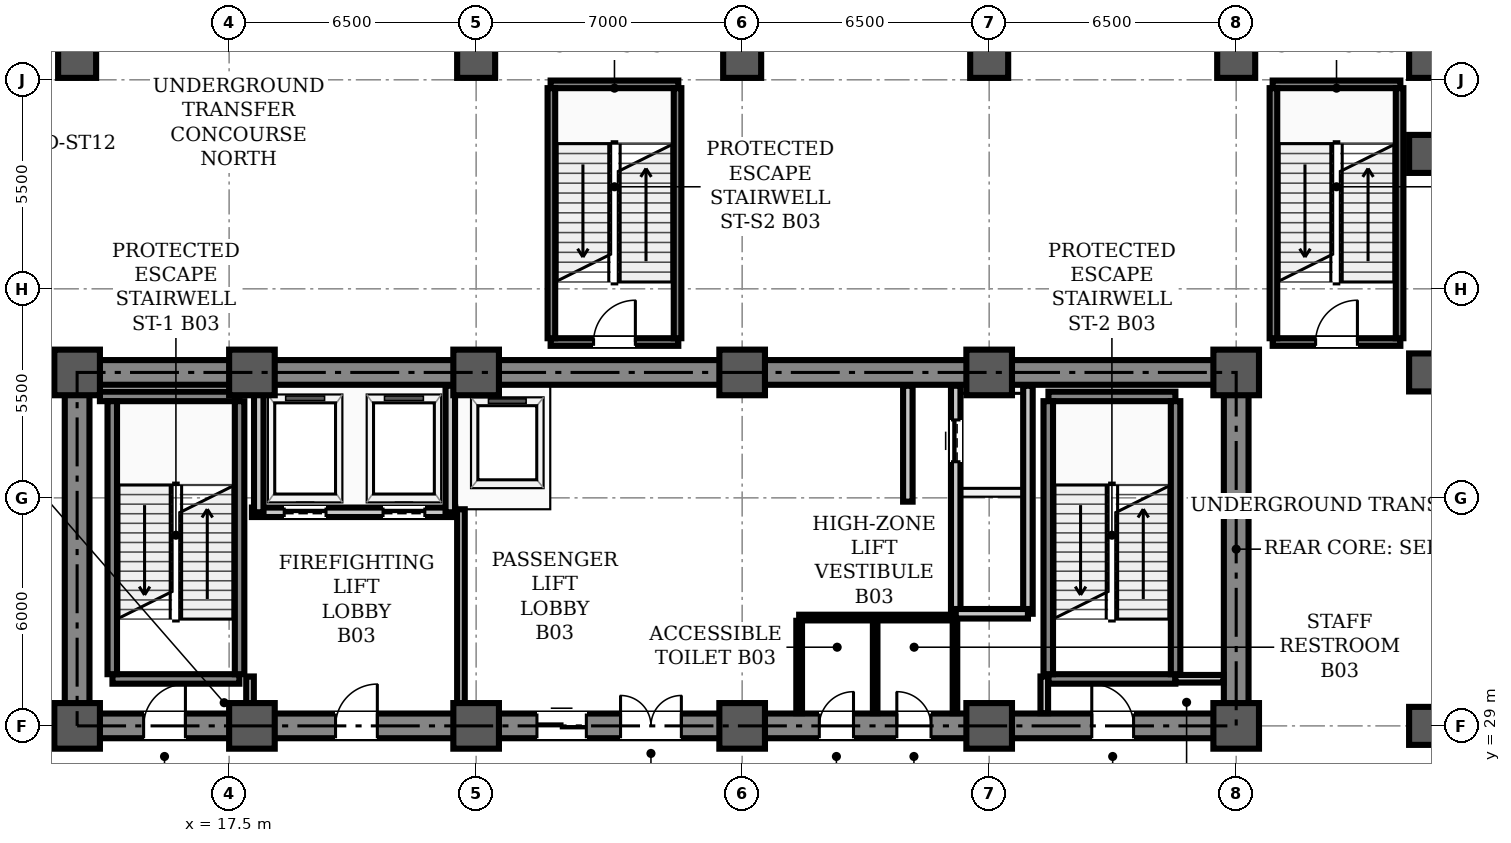
"""IFC4 building model, lengths in metres.
Left out: names, types, materials, properties, quantities, classifications, styles, units other than length and angle.
Written with IfcOpenShell. Run it as: python <this file> out.ifc"""

import sys

from ifc_helpers import new_model, si_unit, direction, frame, frame_2d, origin, origin_2d, place, context, subcontext, project, spatial, rectangle, hollow_rectangle, extrude, element, fill, save


model = new_model("IFC4")
c1 = context("Model", 3, precision=1e-05, world=origin(), true_north=direction((0.0, 1.0)))
c2 = subcontext(c1, "Body", "Model", "MODEL_VIEW")
j1 = project(units=[si_unit("LENGTHUNIT", "METRE"), si_unit("PLANEANGLEUNIT", "RADIAN")], contexts=[c1])
p1 = place(None, origin())
s1 = spatial("IfcSite", under=j1, at=p1, CompositionType="ELEMENT")
p2 = place(p1, origin())
s2 = spatial("IfcBuilding", under=s1, at=p2, CompositionType="ELEMENT")
p3 = place(p2, frame((0.0, 0.0, -15.6)))
s3 = spatial("IfcBuildingStorey", under=s2, at=p3, CompositionType="ELEMENT", Elevation=-15.6)
for number, where, z_axis, x_axis in (
    (1, (13.5, 29.0, 0.0), (0.0, 0.0, 1.0), (1.0, 0.0, 0.0)),
    (2, (13.5, 38.3, 0.0), (0.0, 0.0, 1.0), (1.0, 0.0, 0.0)),
    (3, (18.1, 29.0, 0.0), (0.0, 0.0, 1.0), (1.0, 0.0, 0.0)),
    (4, (18.1, 38.3, 0.0), (0.0, 0.0, 1.0), (1.0, 0.0, 0.0)),
    (5, (24.0, 29.0, 0.0), (0.0, 0.0, 1.0), (1.0, 0.0, 0.0)),
    (6, (24.0, 38.3, 0.0), (0.0, 0.0, 1.0), (1.0, 0.0, 0.0)),
    (7, (31.0, 29.0, 0.0), (0.0, 0.0, 1.0), (1.0, 0.0, 0.0)),
    (8, (31.0, 38.3, 0.0), (0.0, 0.0, 1.0), (1.0, 0.0, 0.0)),
    (9, (37.5, 29.0, 0.0), (0.0, 0.0, 1.0), (1.0, 0.0, 0.0)),
    (10, (37.5, 38.3, 0.0), (0.0, 0.0, 1.0), (1.0, 0.0, 0.0)),
    (11, (44.0, 29.0, 0.0), (0.0, 0.0, 1.0), (1.0, 0.0, 0.0)),
    (12, (44.0, 38.3, 0.0), (0.0, 0.0, 1.0), (1.0, 0.0, 0.0)),
):
    element("IfcColumn", number, at=place(p3, frame(where, z_axis=z_axis, x_axis=x_axis)), inside=s3, PredefinedType="COLUMN", context=c2, shape_type="SweptSolid", body=[
        extrude(hollow_rectangle(XDim=1.2, YDim=1.2, WallThickness=0.04, InnerFilletRadius=0.02, OuterFilletRadius=0.06, at=origin_2d()), origin(), (0.0, 0.0, 1.0), 5.4),
    ])
for number, where, z_axis, x_axis in (
    (13, (13.5, 46.55, 0.0), (0.0, 0.0, 1.0), (1.0, 0.0, 0.0)),
    (14, (24.0, 46.55, 0.0), (0.0, 0.0, 1.0), (1.0, 0.0, 0.0)),
    (15, (31.0, 46.55, 0.0), (0.0, 0.0, 1.0), (1.0, 0.0, 0.0)),
    (16, (37.5, 46.55, 0.0), (0.0, 0.0, 1.0), (1.0, 0.0, 0.0)),
    (17, (44.0, 46.55, 0.0), (0.0, 0.0, 1.0), (1.0, 0.0, 0.0)),
    (18, (49.05, 29.0, 0.0), (0.0, 0.0, 1.0), (1.0, 0.0, 0.0)),
    (19, (49.05, 38.3, 0.0), (0.0, 0.0, 1.0), (1.0, 0.0, 0.0)),
    (20, (49.05, 44.05, 0.0), (0.0, 0.0, 1.0), (1.0, 0.0, 0.0)),
    (21, (49.05, 46.55, 0.0), (0.0, 0.0, 1.0), (1.0, 0.0, 0.0)),
):
    element("IfcColumn", number, at=place(p3, frame(where, z_axis=z_axis, x_axis=x_axis)), inside=s3, PredefinedType="COLUMN", context=c2, shape_type="SweptSolid", body=[
        extrude(rectangle(XDim=1.0, YDim=1.0, at=origin_2d()), origin(), (0.0, 0.0, 1.0), 5.4),
    ])
p4 = place(p3, frame((13.5, 29.0, 0.0), z_axis=(0.0, 0.0, 1.0), x_axis=(1.0, 0.0, 0.0)))
e22 = element("IfcWall", 22, at=p4, inside=s3, PredefinedType="SHEAR", context=c2, shape_type="SweptSolid", body=[
    extrude(rectangle(XDim=30.5, YDim=0.65, at=frame_2d((15.25, 0.0))), origin(), (0.0, 0.0, 1.0), 5.12),
])
p5 = place(p4, frame((1.75, 0.0, 0.0)))
e23 = element("IfcOpeningElement", 23, at=p5, cuts=e22, PredefinedType="OPENING", context=c2, shape_type="SweptSolid", body=[
    extrude(rectangle(XDim=1.1, YDim=2.08, at=frame_2d((0.55, 1.04))), frame((0.0, 0.335, 0.0), z_axis=(0.0, -1.0, 0.0), x_axis=(1.0, 0.0, 0.0)), (0.0, 0.0, 1.0), 0.67),
])
p6 = place(p4, frame((26.7, 0.0, 0.0)))
e24 = element("IfcOpeningElement", 24, at=p6, cuts=e22, PredefinedType="OPENING", context=c2, shape_type="SweptSolid", body=[
    extrude(rectangle(XDim=1.1, YDim=2.08, at=frame_2d((0.55, 1.04))), frame((0.0, 0.335, 0.0), z_axis=(0.0, -1.0, 0.0), x_axis=(1.0, 0.0, 0.0)), (0.0, 0.0, 1.0), 0.67),
])
p7 = place(p4, frame((6.8, 0.0, 0.0)))
e25 = element("IfcOpeningElement", 25, at=p7, cuts=e22, PredefinedType="OPENING", context=c2, shape_type="SweptSolid", body=[
    extrude(rectangle(XDim=1.1, YDim=2.08, at=frame_2d((0.55, 1.04))), frame((0.0, 0.335, 0.0), z_axis=(0.0, -1.0, 0.0), x_axis=(1.0, 0.0, 0.0)), (0.0, 0.0, 1.0), 0.67),
])
p8 = place(p4, frame((14.3, 0.0, 0.0)))
e26 = element("IfcOpeningElement", 26, at=p8, cuts=e22, PredefinedType="OPENING", context=c2, shape_type="SweptSolid", body=[
    extrude(rectangle(XDim=1.6, YDim=2.08, at=frame_2d((0.8, 1.04))), frame((0.0, 0.335, 0.0), z_axis=(0.0, -1.0, 0.0), x_axis=(1.0, 0.0, 0.0)), (0.0, 0.0, 1.0), 0.67),
])
p9 = place(p4, frame((19.53, 0.0, 0.0)))
e27 = element("IfcOpeningElement", 27, at=p9, cuts=e22, PredefinedType="OPENING", context=c2, shape_type="SweptSolid", body=[
    extrude(rectangle(XDim=0.9, YDim=2.08, at=frame_2d((0.45, 1.04))), frame((0.0, 0.335, 0.0), z_axis=(0.0, -1.0, 0.0), x_axis=(1.0, 0.0, 0.0)), (0.0, 0.0, 1.0), 0.67),
])
p10 = place(p4, frame((21.57, 0.0, 0.0)))
e28 = element("IfcOpeningElement", 28, at=p10, cuts=e22, PredefinedType="OPENING", context=c2, shape_type="SweptSolid", body=[
    extrude(rectangle(XDim=0.9, YDim=2.08, at=frame_2d((0.45, 1.04))), frame((0.0, 0.335, 0.0), z_axis=(0.0, -1.0, 0.0), x_axis=(1.0, 0.0, 0.0)), (0.0, 0.0, 1.0), 0.67),
])
p11 = place(p4, frame((12.1, 0.0, 0.0)))
e29 = element("IfcOpeningElement", 29, at=p11, cuts=e22, PredefinedType="OPENING", context=c2, shape_type="SweptSolid", body=[
    extrude(rectangle(XDim=1.3, YDim=2.08, at=frame_2d((0.65, 1.04))), frame((0.0, 0.335, 0.0), z_axis=(0.0, -1.0, 0.0), x_axis=(1.0, 0.0, 0.0)), (0.0, 0.0, 1.0), 0.67),
])
p12 = place(p3, frame((13.5, 38.3, 0.0), z_axis=(0.0, 0.0, 1.0), x_axis=(1.0, 0.0, 0.0)))
e30 = element("IfcWall", 30, at=p12, inside=s3, PredefinedType="SHEAR", context=c2, shape_type="SweptSolid", body=[
    extrude(rectangle(XDim=30.5, YDim=0.65, at=frame_2d((15.25, 0.0))), origin(), (0.0, 0.0, 1.0), 5.12),
])
for number, where, z_axis, x_axis in (
    (31, (13.5, 29.35, 0.0), (0.0, 0.0, 1.0), (0.0, 1.0, 0.0)),
    (32, (44.0, 29.35, 0.0), (0.0, 0.0, 1.0), (0.0, 1.0, 0.0)),
):
    element("IfcWall", number, at=place(p3, frame(where, z_axis=z_axis, x_axis=x_axis)), inside=s3, PredefinedType="SHEAR", context=c2, shape_type="SweptSolid", body=[
        extrude(rectangle(XDim=8.6, YDim=0.65, at=frame_2d((4.3, 0.0))), origin(), (0.0, 0.0, 1.0), 5.12),
    ])
p13 = place(p3, frame((14.43, 30.235, 0.0), z_axis=(0.0, 0.0, 1.0), x_axis=(1.0, 0.0, 0.0)))
e33 = element("IfcWall", 33, at=p13, inside=s3, PredefinedType="STANDARD", context=c2, shape_type="SweptSolid", body=[
    extrude(rectangle(XDim=3.34, YDim=0.25, at=frame_2d((1.67, 0.0))), origin(), (0.0, 0.0, 1.0), 5.12),
])
p14 = place(p3, frame((14.1, 37.669, 0.0), z_axis=(0.0, 0.0, 1.0), x_axis=(1.0, 0.0, 0.0)))
e34 = element("IfcWall", 34, at=p14, inside=s3, PredefinedType="STANDARD", context=c2, shape_type="SweptSolid", body=[
    extrude(rectangle(XDim=3.67, YDim=0.25, at=frame_2d((1.835, 0.0))), origin(), (0.0, 0.0, 1.0), 5.12),
])
for number, where, z_axis, x_axis in (
    (35, (14.425, 30.36, 0.0), (0.0, 0.0, 1.0), (0.0, 1.0, 0.0)),
    (36, (17.775, 30.36, 0.0), (0.0, 0.0, 1.0), (0.0, 1.0, 0.0)),
):
    element("IfcWall", number, at=place(p3, frame(where, z_axis=z_axis, x_axis=x_axis)), inside=s3, PredefinedType="STANDARD", context=c2, shape_type="SweptSolid", body=[
        extrude(rectangle(XDim=7.184, YDim=0.25, at=frame_2d((3.592, 0.0))), origin(), (0.0, 0.0, 1.0), 5.12),
    ])
for number, where, z_axis, x_axis in (
    (37, (39.06, 30.235, 0.0), (0.0, 0.0, 1.0), (1.0, 0.0, 0.0)),
    (38, (39.06, 37.669, 0.0), (0.0, 0.0, 1.0), (1.0, 0.0, 0.0)),
):
    element("IfcWall", number, at=place(p3, frame(where, z_axis=z_axis, x_axis=x_axis)), inside=s3, PredefinedType="STANDARD", context=c2, shape_type="SweptSolid", body=[
        extrude(rectangle(XDim=3.34, YDim=0.25, at=frame_2d((1.67, 0.0))), origin(), (0.0, 0.0, 1.0), 5.12),
    ])
for number, where, z_axis, x_axis in (
    (39, (39.055, 30.36, 0.0), (0.0, 0.0, 1.0), (0.0, 1.0, 0.0)),
    (40, (42.405, 30.36, 0.0), (0.0, 0.0, 1.0), (0.0, 1.0, 0.0)),
):
    element("IfcWall", number, at=place(p3, frame(where, z_axis=z_axis, x_axis=x_axis)), inside=s3, PredefinedType="STANDARD", context=c2, shape_type="SweptSolid", body=[
        extrude(rectangle(XDim=7.184, YDim=0.25, at=frame_2d((3.592, 0.0))), origin(), (0.0, 0.0, 1.0), 5.12),
    ])
p15 = place(p3, frame((18.1, 34.62, 0.0), z_axis=(0.0, 0.0, 1.0), x_axis=(1.0, 0.0, 0.0)))
e41 = element("IfcWall", 41, at=p15, inside=s3, PredefinedType="STANDARD", context=c2, shape_type="SweptSolid", body=[
    extrude(rectangle(XDim=5.35, YDim=0.25, at=frame_2d((2.675, 0.0))), origin(), (0.0, 0.0, 1.0), 4.4),
])
p16 = place(p15, frame((0.85, 0.0, 0.0)))
e42 = element("IfcOpeningElement", 42, at=p16, cuts=e41, PredefinedType="OPENING", context=c2, shape_type="SweptSolid", body=[
    extrude(rectangle(XDim=1.1, YDim=2.08, at=frame_2d((0.55, 1.04))), frame((0.0, 0.135, 0.0), z_axis=(0.0, -1.0, 0.0), x_axis=(1.0, 0.0, 0.0)), (0.0, 0.0, 1.0), 0.27),
])
p17 = place(p15, frame((3.45, 0.0, 0.0)))
e43 = element("IfcOpeningElement", 43, at=p17, cuts=e41, PredefinedType="OPENING", context=c2, shape_type="SweptSolid", body=[
    extrude(rectangle(XDim=1.1, YDim=2.08, at=frame_2d((0.55, 1.04))), frame((0.0, 0.135, 0.0), z_axis=(0.0, -1.0, 0.0), x_axis=(1.0, 0.0, 0.0)), (0.0, 0.0, 1.0), 0.27),
])
p18 = place(p3, frame((36.62, 31.95, 0.0), z_axis=(0.0, 0.0, 1.0), x_axis=(0.0, 1.0, 0.0)))
e44 = element("IfcWall", 44, at=p18, inside=s3, PredefinedType="STANDARD", context=c2, shape_type="SweptSolid", body=[
    extrude(rectangle(XDim=6.0, YDim=0.25, at=frame_2d((3.0, 0.0))), origin(), (0.0, 0.0, 1.0), 4.3),
])
p19 = place(p18, frame((4.0, 0.0, 0.0)))
e45 = element("IfcOpeningElement", 45, at=p19, cuts=e44, PredefinedType="OPENING", context=c2, shape_type="SweptSolid", body=[
    extrude(rectangle(XDim=1.1, YDim=2.08, at=frame_2d((0.55, 1.04))), frame((0.0, 0.135, 0.0), z_axis=(0.0, -1.0, 0.0), x_axis=(1.0, 0.0, 0.0)), (0.0, 0.0, 1.0), 0.27),
])
p20 = place(p3, frame((38.52, 31.95, 0.0), z_axis=(0.0, 0.0, 1.0), x_axis=(0.0, 1.0, 0.0)))
e46 = element("IfcWall", 46, at=p20, inside=s3, PredefinedType="STANDARD", context=c2, shape_type="SweptSolid", body=[
    extrude(rectangle(XDim=6.0, YDim=0.25, at=frame_2d((3.0, 0.0))), origin(), (0.0, 0.0, 1.0), 4.3),
])
p21 = place(p3, frame((36.62, 31.95, 0.0), z_axis=(0.0, 0.0, 1.0), x_axis=(1.0, 0.0, 0.0)))
e47 = element("IfcWall", 47, at=p21, inside=s3, PredefinedType="STANDARD", context=c2, shape_type="SweptSolid", body=[
    extrude(rectangle(XDim=1.9, YDim=0.25, at=frame_2d((0.95, 0.0))), origin(), (0.0, 0.0, 1.0), 4.98),
])
for number, where, z_axis, x_axis in (
    (48, (18.28, 34.62, 0.0), (0.0, 0.0, 1.0), (0.0, 1.0, 0.0)),
    (49, (23.32, 34.62, 0.0), (0.0, 0.0, 1.0), (0.0, 1.0, 0.0)),
):
    element("IfcWall", number, at=place(p3, frame(where, z_axis=z_axis, x_axis=x_axis)), inside=s3, PredefinedType="STANDARD", context=c2, shape_type="SweptSolid", body=[
        extrude(rectangle(XDim=3.33, YDim=0.25, at=frame_2d((1.665, 0.0))), origin(), (0.0, 0.0, 1.0), 4.3),
    ])
p22 = place(p3, frame((35.36, 34.9, 0.0), z_axis=(0.0, 0.0, 1.0), x_axis=(0.0, 1.0, 0.0)))
e50 = element("IfcWall", 50, at=p22, inside=s3, PredefinedType="STANDARD", context=c2, shape_type="SweptSolid", body=[
    extrude(rectangle(XDim=3.05, YDim=0.25, at=frame_2d((1.525, 0.0))), origin(), (0.0, 0.0, 1.0), 4.3),
])
p23 = place(p3, frame((25.96, 39.1, 0.0), z_axis=(0.0, 0.0, 1.0), x_axis=(1.0, 0.0, 0.0)))
e51 = element("IfcWall", 51, at=p23, inside=s3, PredefinedType="STANDARD", context=c2, shape_type="SweptSolid", body=[
    extrude(rectangle(XDim=3.36, YDim=0.2, at=frame_2d((1.68, 0.0))), origin(), (0.0, 0.0, 1.0), 5.12),
])
p24 = place(p23, frame((1.13, 0.0, 0.0)))
e52 = element("IfcOpeningElement", 52, at=p24, cuts=e51, PredefinedType="OPENING", context=c2, shape_type="SweptSolid", body=[
    extrude(rectangle(XDim=1.1, YDim=2.08, at=frame_2d((0.55, 1.04))), frame((0.0, 0.11, 0.0), z_axis=(0.0, -1.0, 0.0), x_axis=(1.0, 0.0, 0.0)), (0.0, 0.0, 1.0), 0.22),
])
p25 = place(p3, frame((25.96, 45.88, 0.0), z_axis=(0.0, 0.0, 1.0), x_axis=(1.0, 0.0, 0.0)))
e53 = element("IfcWall", 53, at=p25, inside=s3, PredefinedType="STANDARD", context=c2, shape_type="SweptSolid", body=[
    extrude(rectangle(XDim=3.36, YDim=0.2, at=frame_2d((1.68, 0.0))), origin(), (0.0, 0.0, 1.0), 5.12),
])
for number, where, z_axis, x_axis in (
    (54, (25.98, 39.2, 0.0), (0.0, 0.0, 1.0), (0.0, 1.0, 0.0)),
    (55, (29.3, 39.2, 0.0), (0.0, 0.0, 1.0), (0.0, 1.0, 0.0)),
):
    element("IfcWall", number, at=place(p3, frame(where, z_axis=z_axis, x_axis=x_axis)), inside=s3, PredefinedType="STANDARD", context=c2, shape_type="SweptSolid", body=[
        extrude(rectangle(XDim=6.58, YDim=0.2, at=frame_2d((3.29, 0.0))), origin(), (0.0, 0.0, 1.0), 5.12),
    ])
p26 = place(p3, frame((44.96, 39.1, 0.0), z_axis=(0.0, 0.0, 1.0), x_axis=(1.0, 0.0, 0.0)))
e56 = element("IfcWall", 56, at=p26, inside=s3, PredefinedType="STANDARD", context=c2, shape_type="SweptSolid", body=[
    extrude(rectangle(XDim=3.36, YDim=0.2, at=frame_2d((1.68, 0.0))), origin(), (0.0, 0.0, 1.0), 5.12),
])
p27 = place(p26, frame((1.13, 0.0, 0.0)))
e57 = element("IfcOpeningElement", 57, at=p27, cuts=e56, PredefinedType="OPENING", context=c2, shape_type="SweptSolid", body=[
    extrude(rectangle(XDim=1.1, YDim=2.08, at=frame_2d((0.55, 1.04))), frame((0.0, 0.11, 0.0), z_axis=(0.0, -1.0, 0.0), x_axis=(1.0, 0.0, 0.0)), (0.0, 0.0, 1.0), 0.22),
])
p28 = place(p3, frame((44.96, 45.88, 0.0), z_axis=(0.0, 0.0, 1.0), x_axis=(1.0, 0.0, 0.0)))
e58 = element("IfcWall", 58, at=p28, inside=s3, PredefinedType="STANDARD", context=c2, shape_type="SweptSolid", body=[
    extrude(rectangle(XDim=3.36, YDim=0.2, at=frame_2d((1.68, 0.0))), origin(), (0.0, 0.0, 1.0), 5.12),
])
for number, where, z_axis, x_axis in (
    (59, (44.98, 39.2, 0.0), (0.0, 0.0, 1.0), (0.0, 1.0, 0.0)),
    (60, (48.3, 39.2, 0.0), (0.0, 0.0, 1.0), (0.0, 1.0, 0.0)),
):
    element("IfcWall", number, at=place(p3, frame(where, z_axis=z_axis, x_axis=x_axis)), inside=s3, PredefinedType="STANDARD", context=c2, shape_type="SweptSolid", body=[
        extrude(rectangle(XDim=6.58, YDim=0.2, at=frame_2d((3.29, 0.0))), origin(), (0.0, 0.0, 1.0), 5.12),
    ])
p29 = place(p3, frame((42.4, 30.24, 0.0), z_axis=(0.0, 0.0, 1.0), x_axis=(1.0, 0.0, 0.0)))
e61 = element("IfcWall", 61, at=p29, inside=s3, PredefinedType="STANDARD", context=c2, shape_type="SweptSolid", body=[
    extrude(rectangle(XDim=1.265, YDim=0.2, at=frame_2d((0.633, 0.0))), origin(), (0.0, 0.0, 1.0), 4.4),
])
p30 = place(p3, frame((32.5, 31.85, 0.0), z_axis=(0.0, 0.0, 1.0), x_axis=(1.0, 0.0, 0.0)))
e62 = element("IfcWall", 62, at=p30, inside=s3, PredefinedType="PARTITIONING", context=c2, shape_type="SweptSolid", body=[
    extrude(rectangle(XDim=4.1, YDim=0.15, at=frame_2d((2.05, 0.0))), origin(), (0.0, 0.0, 1.0), 4.65),
])
for number, where, z_axis, x_axis in (
    (63, (18.05, 29.335, 0.0), (0.0, 0.0, 1.0), (0.0, 1.0, 0.0)),
    (64, (38.95, 29.335, 0.0), (0.0, 0.0, 1.0), (0.0, 1.0, 0.0)),
):
    element("IfcWall", number, at=place(p3, frame(where, z_axis=z_axis, x_axis=x_axis)), inside=s3, PredefinedType="STANDARD", context=c2, shape_type="SweptSolid", body=[
        extrude(rectangle(XDim=0.965, YDim=0.2, at=frame_2d((0.482, 0.0))), origin(), (0.0, 0.0, 1.0), 4.3),
    ])
p31 = place(p3, frame((23.6, 29.335, 0.0), z_axis=(0.0, 0.0, 1.0), x_axis=(0.0, 1.0, 0.0)))
e65 = element("IfcWall", 65, at=p31, inside=s3, PredefinedType="STANDARD", context=c2, shape_type="SweptSolid", body=[
    extrude(rectangle(XDim=5.365, YDim=0.2, at=frame_2d((2.683, 0.0))), origin(), (0.0, 0.0, 1.0), 4.3),
])
p32 = place(p3, frame((32.5, 29.335, 0.0), z_axis=(0.0, 0.0, 1.0), x_axis=(0.0, 1.0, 0.0)))
e66 = element("IfcWall", 66, at=p32, inside=s3, PredefinedType="PARTITIONING", context=c2, shape_type="SweptSolid", body=[
    extrude(rectangle(XDim=2.43, YDim=0.15, at=frame_2d((1.215, 0.0))), origin(), (0.0, 0.0, 1.0), 4.3),
])
for number, where, z_axis, x_axis in (
    (67, (36.6, 29.335, 0.0), (0.0, 0.0, 1.0), (0.0, 1.0, 0.0)),
    (68, (34.5, 29.335, 0.0), (0.0, 0.0, 1.0), (0.0, 1.0, 0.0)),
):
    element("IfcWall", number, at=place(p3, frame(where, z_axis=z_axis, x_axis=x_axis)), inside=s3, PredefinedType="PARTITIONING", context=c2, shape_type="SweptSolid", body=[
        extrude(rectangle(XDim=2.43, YDim=0.12, at=frame_2d((1.215, 0.0))), origin(), (0.0, 0.0, 1.0), 4.3),
    ])
p33 = place(p24, origin())
e69 = element("IfcDoor", 69, at=p33, inside=s3, OperationType="SINGLE_SWING_RIGHT", PredefinedType="DOOR", context=c2, shape_type="SweptSolid", body=[
    extrude(rectangle(XDim=1.1, YDim=2.08, at=frame_2d((0.55, 1.04))), frame((0.0, 0.025, 0.0), z_axis=(0.0, -1.0, 0.0), x_axis=(1.0, 0.0, 0.0)), (0.0, 0.0, 1.0), 0.05),
])
fill(e52, e69)
p34 = place(p27, origin())
e70 = element("IfcDoor", 70, at=p34, inside=s3, OperationType="SINGLE_SWING_RIGHT", PredefinedType="DOOR", context=c2, shape_type="SweptSolid", body=[
    extrude(rectangle(XDim=1.1, YDim=2.08, at=frame_2d((0.55, 1.04))), frame((0.0, 0.025, 0.0), z_axis=(0.0, -1.0, 0.0), x_axis=(1.0, 0.0, 0.0)), (0.0, 0.0, 1.0), 0.05),
])
fill(e57, e70)
p35 = place(p5, origin())
e71 = element("IfcDoor", 71, at=p35, inside=s3, OperationType="SINGLE_SWING_RIGHT", PredefinedType="DOOR", context=c2, shape_type="SweptSolid", body=[
    extrude(rectangle(XDim=1.1, YDim=2.08, at=frame_2d((0.55, 1.04))), frame((0.0, 0.025, 0.0), z_axis=(0.0, -1.0, 0.0), x_axis=(1.0, 0.0, 0.0)), (0.0, 0.0, 1.0), 0.05),
])
fill(e23, e71)
p36 = place(p6, origin())
e72 = element("IfcDoor", 72, at=p36, inside=s3, OperationType="SINGLE_SWING_LEFT", PredefinedType="DOOR", context=c2, shape_type="SweptSolid", body=[
    extrude(rectangle(XDim=1.1, YDim=2.08, at=frame_2d((0.55, 1.04))), frame((0.0, 0.025, 0.0), z_axis=(0.0, -1.0, 0.0), x_axis=(1.0, 0.0, 0.0)), (0.0, 0.0, 1.0), 0.05),
])
fill(e24, e72)
p37 = place(p7, origin())
e73 = element("IfcDoor", 73, at=p37, inside=s3, OperationType="SINGLE_SWING_RIGHT", PredefinedType="DOOR", context=c2, shape_type="SweptSolid", body=[
    extrude(rectangle(XDim=1.1, YDim=2.08, at=frame_2d((0.55, 1.04))), frame((0.0, 0.025, 0.0), z_axis=(0.0, -1.0, 0.0), x_axis=(1.0, 0.0, 0.0)), (0.0, 0.0, 1.0), 0.05),
])
fill(e25, e73)
p38 = place(p8, origin())
e74 = element("IfcDoor", 74, at=p38, inside=s3, OperationType="DOUBLE_DOOR_SINGLE_SWING", PredefinedType="DOOR", context=c2, shape_type="SweptSolid", body=[
    extrude(rectangle(XDim=1.6, YDim=2.08, at=frame_2d((0.8, 1.04))), frame((0.0, 0.025, 0.0), z_axis=(0.0, -1.0, 0.0), x_axis=(1.0, 0.0, 0.0)), (0.0, 0.0, 1.0), 0.05),
])
fill(e26, e74)
p39 = place(p9, origin())
e75 = element("IfcDoor", 75, at=p39, inside=s3, OperationType="SINGLE_SWING_RIGHT", PredefinedType="DOOR", context=c2, shape_type="SweptSolid", body=[
    extrude(rectangle(XDim=0.9, YDim=2.08, at=frame_2d((0.45, 1.04))), frame((0.0, 0.025, 0.0), z_axis=(0.0, -1.0, 0.0), x_axis=(1.0, 0.0, 0.0)), (0.0, 0.0, 1.0), 0.05),
])
fill(e27, e75)
p40 = place(p10, origin())
e76 = element("IfcDoor", 76, at=p40, inside=s3, OperationType="SINGLE_SWING_LEFT", PredefinedType="DOOR", context=c2, shape_type="SweptSolid", body=[
    extrude(rectangle(XDim=0.9, YDim=2.08, at=frame_2d((0.45, 1.04))), frame((0.0, 0.025, 0.0), z_axis=(0.0, -1.0, 0.0), x_axis=(1.0, 0.0, 0.0)), (0.0, 0.0, 1.0), 0.05),
])
fill(e28, e76)
p41 = place(p16, origin())
e77 = element("IfcDoor", 77, at=p41, inside=s3, OperationType="SLIDING_TO_LEFT", PredefinedType="DOOR", context=c2, shape_type="SweptSolid", body=[
    extrude(rectangle(XDim=1.1, YDim=2.08, at=frame_2d((0.55, 1.04))), frame((0.0, 0.025, 0.0), z_axis=(0.0, -1.0, 0.0), x_axis=(1.0, 0.0, 0.0)), (0.0, 0.0, 1.0), 0.05),
])
fill(e42, e77)
p42 = place(p17, origin())
e78 = element("IfcDoor", 78, at=p42, inside=s3, OperationType="SLIDING_TO_LEFT", PredefinedType="DOOR", context=c2, shape_type="SweptSolid", body=[
    extrude(rectangle(XDim=1.1, YDim=2.08, at=frame_2d((0.55, 1.04))), frame((0.0, 0.025, 0.0), z_axis=(0.0, -1.0, 0.0), x_axis=(1.0, 0.0, 0.0)), (0.0, 0.0, 1.0), 0.05),
])
fill(e43, e78)
p43 = place(p19, origin())
e79 = element("IfcDoor", 79, at=p43, inside=s3, OperationType="SLIDING_TO_LEFT", PredefinedType="DOOR", context=c2, shape_type="SweptSolid", body=[
    extrude(rectangle(XDim=1.1, YDim=2.08, at=frame_2d((0.55, 1.04))), frame((0.0, 0.025, 0.0), z_axis=(0.0, -1.0, 0.0), x_axis=(1.0, 0.0, 0.0)), (0.0, 0.0, 1.0), 0.05),
])
fill(e45, e79)
p44 = place(p11, origin())
e80 = element("IfcDoor", 80, at=p44, inside=s3, OperationType="DOUBLE_DOOR_SLIDING", PredefinedType="DOOR", context=c2, shape_type="SweptSolid", body=[
    extrude(rectangle(XDim=1.3, YDim=2.08, at=frame_2d((0.65, 1.04))), frame((0.0, 0.025, 0.0), z_axis=(0.0, -1.0, 0.0), x_axis=(1.0, 0.0, 0.0)), (0.0, 0.0, 1.0), 0.05),
])
fill(e29, e80)
save(model, sys.argv[1])
